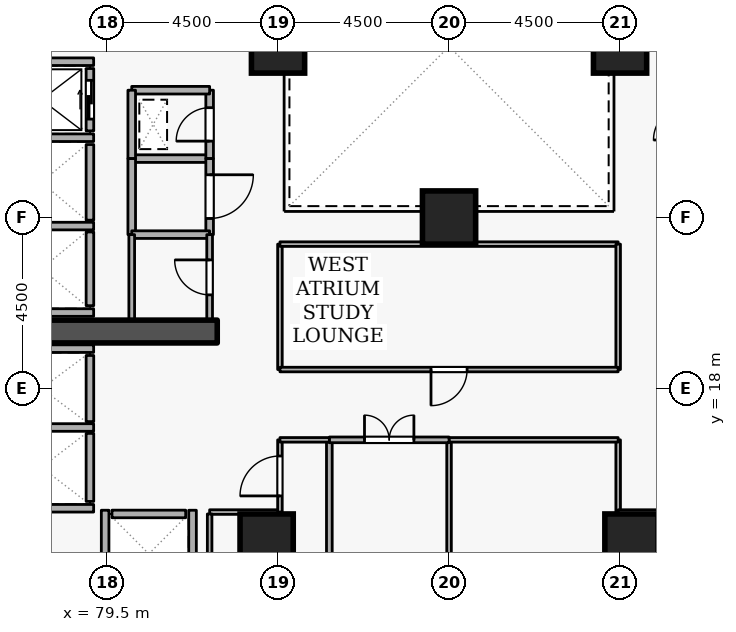
"""IFC4 building model, lengths in metres.
Left out: names, types, materials, properties, quantities, classifications, styles, units other than length and angle.
Written with IfcOpenShell. Run it as: python <this file> out.ifc"""

import sys

from ifc_helpers import new_model, si_unit, direction, frame, frame_2d, origin, origin_2d, place, context, subcontext, project, spatial, rectangle, extrude, element, fill, save


model = new_model("IFC4")
c1 = context("Model", 3, precision=1e-05, world=origin(), true_north=direction((0.0, 1.0)))
c2 = subcontext(c1, "Body", "Model", "MODEL_VIEW")
j1 = project(units=[si_unit("LENGTHUNIT", "METRE"), si_unit("PLANEANGLEUNIT", "RADIAN")], contexts=[c1])
p1 = place(None, origin())
s1 = spatial("IfcSite", under=j1, at=p1, CompositionType="ELEMENT")
p2 = place(p1, origin())
s2 = spatial("IfcBuilding", under=s1, at=p2, CompositionType="ELEMENT")
p3 = place(p2, frame((0.0, 0.0, 38.7)))
s3 = spatial("IfcBuildingStorey", under=s2, at=p3, CompositionType="ELEMENT", Elevation=38.7)
p4 = place(p3, frame((76.7, 19.5, 0.0), z_axis=(0.0, 0.0, 1.0), x_axis=(1.0, 0.0, 0.0)))
e1 = element("IfcWall", 1, at=p4, inside=s3, PredefinedType="SHEAR", context=c2, shape_type="SweptSolid", body=[
    extrude(rectangle(XDim=5.7, YDim=0.6, at=frame_2d((2.85, 0.0))), origin(), (0.0, 0.0, 1.0), 3.6),
])
for number, where, z_axis, x_axis in (
    (2, (93.3, 14.0, 0.0), (0.0, 0.0, 1.0), (1.0, 0.0, 0.0)),
    (3, (83.7, 14.0, 0.0), (0.0, 0.0, 1.0), (1.0, 0.0, 0.0)),
    (4, (93.0, 27.0, 0.0), (0.0, 0.0, 1.0), (1.0, 0.0, 0.0)),
    (5, (84.0, 27.0, 0.0), (0.0, 0.0, 1.0), (1.0, 0.0, 0.0)),
    (6, (88.5, 22.5, 0.0), (0.0, 0.0, 1.0), (1.0, 0.0, 0.0)),
):
    element("IfcColumn", number, at=place(p3, frame(where, z_axis=z_axis, x_axis=x_axis)), inside=s3, PredefinedType="COLUMN", context=c2, shape_type="SweptSolid", body=[
        extrude(rectangle(XDim=1.4, YDim=1.4, at=origin_2d()), origin(), (0.0, 0.0, 1.0), 3.6),
    ])
p5 = place(p3, frame((79.05, 24.78, 0.0), z_axis=(0.0, 0.0, 1.0), x_axis=(0.0, 1.0, 0.0)))
e7 = element("IfcWall", 7, at=p5, inside=s3, PredefinedType="STANDARD", context=c2, shape_type="SweptSolid", body=[
    extrude(rectangle(XDim=1.64, YDim=0.2, at=frame_2d((0.82, 0.0))), origin(), (0.0, 0.0, 1.0), 3.34),
])
p6 = place(p5, frame((0.31, 0.0, 0.0)))
e8 = element("IfcOpeningElement", 8, at=p6, cuts=e7, PredefinedType="OPENING", context=c2, shape_type="SweptSolid", body=[
    extrude(rectangle(XDim=1.02, YDim=2.06, at=frame_2d((0.51, 1.03))), frame((0.0, 0.11, 0.0), z_axis=(0.0, -1.0, 0.0), x_axis=(1.0, 0.0, 0.0)), (0.0, 0.0, 1.0), 0.22),
])
p7 = place(p3, frame((79.05, 22.43, 0.0), z_axis=(0.0, 0.0, 1.0), x_axis=(0.0, 1.0, 0.0)))
e9 = element("IfcWall", 9, at=p7, inside=s3, PredefinedType="STANDARD", context=c2, shape_type="SweptSolid", body=[
    extrude(rectangle(XDim=1.99, YDim=0.2, at=frame_2d((0.995, 0.0))), origin(), (0.0, 0.0, 1.0), 3.34),
])
p8 = place(p3, frame((79.05, 20.18, 0.0), z_axis=(0.0, 0.0, 1.0), x_axis=(0.0, 1.0, 0.0)))
e10 = element("IfcWall", 10, at=p8, inside=s3, PredefinedType="STANDARD", context=c2, shape_type="SweptSolid", body=[
    extrude(rectangle(XDim=1.94, YDim=0.2, at=frame_2d((0.97, 0.0))), origin(), (0.0, 0.0, 1.0), 3.34),
])
p9 = place(p3, frame((79.05, 17.13, 0.0), z_axis=(0.0, 0.0, 1.0), x_axis=(0.0, 1.0, 0.0)))
e11 = element("IfcWall", 11, at=p9, inside=s3, PredefinedType="STANDARD", context=c2, shape_type="SweptSolid", body=[
    extrude(rectangle(XDim=1.74, YDim=0.2, at=frame_2d((0.87, 0.0))), origin(), (0.0, 0.0, 1.0), 3.34),
])
p10 = place(p3, frame((79.05, 15.03, 0.0), z_axis=(0.0, 0.0, 1.0), x_axis=(0.0, 1.0, 0.0)))
e12 = element("IfcWall", 12, at=p10, inside=s3, PredefinedType="STANDARD", context=c2, shape_type="SweptSolid", body=[
    extrude(rectangle(XDim=1.79, YDim=0.2, at=frame_2d((0.895, 0.0))), origin(), (0.0, 0.0, 1.0), 3.34),
])
p11 = place(p3, frame((79.63, 14.7, 0.0), z_axis=(0.0, 0.0, 1.0), x_axis=(1.0, 0.0, 0.0)))
e13 = element("IfcWall", 13, at=p11, inside=s3, PredefinedType="STANDARD", context=c2, shape_type="SweptSolid", body=[
    extrude(rectangle(XDim=1.94, YDim=0.2, at=frame_2d((0.97, 0.0))), origin(), (0.0, 0.0, 1.0), 3.34),
])
for number, where, z_axis, x_axis in (
    (14, (76.712, 26.6, 0.0), (0.0, 0.0, 1.0), (1.0, 0.0, 0.0)),
    (15, (76.712, 24.6, 0.0), (0.0, 0.0, 1.0), (1.0, 0.0, 0.0)),
    (16, (76.712, 22.275, 0.0), (0.0, 0.0, 1.0), (1.0, 0.0, 0.0)),
    (17, (76.712, 20.0, 0.0), (0.0, 0.0, 1.0), (1.0, 0.0, 0.0)),
):
    element("IfcWall", number, at=place(p3, frame(where, z_axis=z_axis, x_axis=x_axis)), inside=s3, PredefinedType="STANDARD", context=c2, shape_type="SweptSolid", body=[
        extrude(rectangle(XDim=2.436, YDim=0.2, at=frame_2d((1.218, 0.0))), origin(), (0.0, 0.0, 1.0), 3.34),
    ])
p12 = place(p3, frame((76.402, 19.05, 0.0), z_axis=(0.0, 0.0, 1.0), x_axis=(1.0, 0.0, 0.0)))
e18 = element("IfcWall", 18, at=p12, inside=s3, PredefinedType="STANDARD", context=c2, shape_type="SweptSolid", body=[
    extrude(rectangle(XDim=2.746, YDim=0.2, at=frame_2d((1.373, 0.0))), origin(), (0.0, 0.0, 1.0), 2.545),
])
p13 = place(p3, frame((76.402, 16.975, 0.0), z_axis=(0.0, 0.0, 1.0), x_axis=(1.0, 0.0, 0.0)))
e19 = element("IfcWall", 19, at=p13, inside=s3, PredefinedType="STANDARD", context=c2, shape_type="SweptSolid", body=[
    extrude(rectangle(XDim=2.746, YDim=0.2, at=frame_2d((1.373, 0.0))), origin(), (0.0, 0.0, 1.0), 3.34),
])
p14 = place(p3, frame((76.512, 14.85, 0.0), z_axis=(0.0, 0.0, 1.0), x_axis=(1.0, 0.0, 0.0)))
e20 = element("IfcWall", 20, at=p14, inside=s3, PredefinedType="STANDARD", context=c2, shape_type="SweptSolid", body=[
    extrude(rectangle(XDim=2.636, YDim=0.2, at=frame_2d((1.318, 0.0))), origin(), (0.0, 0.0, 1.0), 3.34),
])
for number, where, z_axis, x_axis in (
    (21, (81.75, 12.612, 0.0), (0.0, 0.0, 1.0), (0.0, 1.0, 0.0)),
    (22, (79.45, 12.612, 0.0), (0.0, 0.0, 1.0), (0.0, 1.0, 0.0)),
):
    element("IfcWall", number, at=place(p3, frame(where, z_axis=z_axis, x_axis=x_axis)), inside=s3, PredefinedType="STANDARD", context=c2, shape_type="SweptSolid", body=[
        extrude(rectangle(XDim=2.186, YDim=0.2, at=frame_2d((1.093, 0.0))), origin(), (0.0, 0.0, 1.0), 3.34),
    ])
p15 = place(p3, frame((80.15, 24.05, 0.0), z_axis=(0.0, 0.0, 1.0), x_axis=(1.0, 0.0, 0.0)))
e23 = element("IfcWall", 23, at=p15, inside=s3, PredefinedType="STANDARD", context=c2, shape_type="SweptSolid", body=[
    extrude(rectangle(XDim=2.05, YDim=0.2, at=frame_2d((1.025, 0.0))), origin(), (0.0, 0.0, 1.0), 3.34),
])
p16 = place(p3, frame((82.2, 24.05, 0.0), z_axis=(0.0, 0.0, 1.0), x_axis=(0.0, 1.0, 0.0)))
e24 = element("IfcWall", 24, at=p16, inside=s3, PredefinedType="STANDARD", context=c2, shape_type="SweptSolid", body=[
    extrude(rectangle(XDim=1.8, YDim=0.2, at=frame_2d((0.9, 0.0))), origin(), (0.0, 0.0, 1.0), 3.34),
])
p17 = place(p16, frame((0.46, 0.0, 0.0)))
e25 = element("IfcOpeningElement", 25, at=p17, cuts=e24, PredefinedType="OPENING", context=c2, shape_type="SweptSolid", body=[
    extrude(rectangle(XDim=0.88, YDim=2.04, at=frame_2d((0.44, 1.02))), frame((0.0, 0.11, 0.0), z_axis=(0.0, -1.0, 0.0), x_axis=(1.0, 0.0, 0.0)), (0.0, 0.0, 1.0), 0.22),
])
p18 = place(p3, frame((82.2, 25.85, 0.0), z_axis=(0.0, 0.0, 1.0), x_axis=(-1.0, 0.0, 0.0)))
e26 = element("IfcWall", 26, at=p18, inside=s3, PredefinedType="STANDARD", context=c2, shape_type="SweptSolid", body=[
    extrude(rectangle(XDim=2.05, YDim=0.2, at=frame_2d((1.025, 0.0))), origin(), (0.0, 0.0, 1.0), 3.34),
])
p19 = place(p3, frame((80.15, 25.85, 0.0), z_axis=(0.0, 0.0, 1.0), x_axis=(0.0, -1.0, 0.0)))
e27 = element("IfcWall", 27, at=p19, inside=s3, PredefinedType="STANDARD", context=c2, shape_type="SweptSolid", body=[
    extrude(rectangle(XDim=1.8, YDim=0.2, at=frame_2d((0.9, 0.0))), origin(), (0.0, 0.0, 1.0), 3.34),
])
p20 = place(p3, frame((80.15, 22.05, 0.0), z_axis=(0.0, 0.0, 1.0), x_axis=(0.0, 1.0, 0.0)))
e28 = element("IfcWall", 28, at=p20, inside=s3, PredefinedType="STANDARD", context=c2, shape_type="SweptSolid", body=[
    extrude(rectangle(XDim=2.0, YDim=0.2, at=frame_2d((1.0, 0.0))), origin(), (0.0, 0.0, 1.0), 3.34),
])
p21 = place(p3, frame((82.2, 24.05, 0.0), z_axis=(0.0, 0.0, 1.0), x_axis=(0.0, -1.0, 0.0)))
e29 = element("IfcWall", 29, at=p21, inside=s3, PredefinedType="STANDARD", context=c2, shape_type="SweptSolid", body=[
    extrude(rectangle(XDim=2.0, YDim=0.2, at=frame_2d((1.0, 0.0))), origin(), (0.0, 0.0, 1.0), 3.34),
])
p22 = place(p21, frame((0.425, 0.0, 0.0)))
e30 = element("IfcOpeningElement", 30, at=p22, cuts=e29, PredefinedType="OPENING", context=c2, shape_type="SweptSolid", body=[
    extrude(rectangle(XDim=1.15, YDim=2.1, at=frame_2d((0.575, 1.05))), frame((0.0, 0.11, 0.0), z_axis=(0.0, -1.0, 0.0), x_axis=(1.0, 0.0, 0.0)), (0.0, 0.0, 1.0), 0.22),
])
p23 = place(p3, frame((82.2, 22.05, 0.0), z_axis=(0.0, 0.0, 1.0), x_axis=(-1.0, 0.0, 0.0)))
e31 = element("IfcWall", 31, at=p23, inside=s3, PredefinedType="STANDARD", context=c2, shape_type="SweptSolid", body=[
    extrude(rectangle(XDim=2.05, YDim=0.2, at=frame_2d((1.025, 0.0))), origin(), (0.0, 0.0, 1.0), 3.34),
])
p24 = place(p3, frame((82.2, 19.8, 0.0), z_axis=(0.0, 0.0, 1.0), x_axis=(0.0, 1.0, 0.0)))
e32 = element("IfcWall", 32, at=p24, inside=s3, PredefinedType="PARTITIONING", context=c2, shape_type="SweptSolid", body=[
    extrude(rectangle(XDim=2.25, YDim=0.15, at=frame_2d((1.125, 0.0))), origin(), (0.0, 0.0, 1.0), 3.34),
])
p25 = place(p24, frame((0.665, 0.0, 0.0)))
e33 = element("IfcOpeningElement", 33, at=p25, cuts=e32, PredefinedType="OPENING", context=c2, shape_type="SweptSolid", body=[
    extrude(rectangle(XDim=0.92, YDim=2.08, at=frame_2d((0.46, 1.04))), frame((0.0, 0.085, 0.0), z_axis=(0.0, -1.0, 0.0), x_axis=(1.0, 0.0, 0.0)), (0.0, 0.0, 1.0), 0.17),
])
p26 = place(p3, frame((80.15, 22.05, 0.0), z_axis=(0.0, 0.0, 1.0), x_axis=(0.0, -1.0, 0.0)))
e34 = element("IfcWall", 34, at=p26, inside=s3, PredefinedType="PARTITIONING", context=c2, shape_type="SweptSolid", body=[
    extrude(rectangle(XDim=2.25, YDim=0.15, at=frame_2d((1.125, 0.0))), origin(), (0.0, 0.0, 1.0), 3.34),
])
p27 = place(p3, frame((92.95, 16.65, 0.0), z_axis=(0.0, 0.0, 1.0), x_axis=(0.0, -1.0, 0.0)))
e35 = element("IfcWall", 35, at=p27, inside=s3, PredefinedType="PARTITIONING", context=c2, shape_type="SweptSolid", body=[
    extrude(rectangle(XDim=1.9, YDim=0.12, at=frame_2d((0.95, 0.0))), origin(), (0.0, 0.0, 1.0), 3.34),
])
p28 = place(p3, frame((92.95, 14.75, 0.0), z_axis=(0.0, 0.0, 1.0), x_axis=(1.0, 0.0, 0.0)))
e36 = element("IfcWall", 36, at=p28, inside=s3, PredefinedType="PARTITIONING", context=c2, shape_type="SweptSolid", body=[
    extrude(rectangle(XDim=1.85, YDim=0.12, at=frame_2d((0.925, 0.0))), origin(), (0.0, 0.0, 1.0), 3.34),
])
p29 = place(p3, frame((88.5, 2.78, 0.0), z_axis=(0.0, 0.0, 1.0), x_axis=(0.0, 1.0, 0.0)))
e37 = element("IfcWall", 37, at=p29, inside=s3, PredefinedType="PARTITIONING", context=c2, shape_type="SweptSolid", body=[
    extrude(rectangle(XDim=13.87, YDim=0.12, at=frame_2d((6.935, 0.0))), origin(), (0.0, 0.0, 1.0), 2.882),
])
p30 = place(p3, frame((88.5, 16.65, 0.0), z_axis=(0.0, 0.0, 1.0), x_axis=(1.0, 0.0, 0.0)))
e38 = element("IfcWall", 38, at=p30, inside=s3, PredefinedType="PARTITIONING", context=c2, shape_type="SweptSolid", body=[
    extrude(rectangle(XDim=4.45, YDim=0.12, at=frame_2d((2.225, 0.0))), origin(), (0.0, 0.0, 1.0), 3.34),
])
p31 = place(p3, frame((85.35, 2.78, 0.0), z_axis=(0.0, 0.0, 1.0), x_axis=(0.0, 1.0, 0.0)))
e39 = element("IfcWall", 39, at=p31, inside=s3, PredefinedType="PARTITIONING", context=c2, shape_type="SweptSolid", body=[
    extrude(rectangle(XDim=13.87, YDim=0.15, at=frame_2d((6.935, 0.0))), origin(), (0.0, 0.0, 1.0), 3.34),
])
p32 = place(p3, frame((85.35, 16.65, 0.0), z_axis=(0.0, 0.0, 1.0), x_axis=(1.0, 0.0, 0.0)))
e40 = element("IfcWall", 40, at=p32, inside=s3, PredefinedType="PARTITIONING", context=c2, shape_type="SweptSolid", body=[
    extrude(rectangle(XDim=3.15, YDim=0.15, at=frame_2d((1.575, 0.0))), origin(), (0.0, 0.0, 1.0), 3.34),
])
p33 = place(p32, frame((0.925, 0.0, 0.0)))
e41 = element("IfcOpeningElement", 41, at=p33, cuts=e40, PredefinedType="OPENING", context=c2, shape_type="SweptSolid", body=[
    extrude(rectangle(XDim=1.3, YDim=2.12, at=frame_2d((0.65, 1.06))), frame((0.0, 0.085, 0.0), z_axis=(0.0, -1.0, 0.0), x_axis=(1.0, 0.0, 0.0)), (0.0, 0.0, 1.0), 0.17),
])
p34 = place(p3, frame((82.2, 14.75, 0.0), z_axis=(0.0, 0.0, 1.0), x_axis=(1.0, 0.0, 0.0)))
e42 = element("IfcWall", 42, at=p34, inside=s3, PredefinedType="PARTITIONING", context=c2, shape_type="SweptSolid", body=[
    extrude(rectangle(XDim=1.85, YDim=0.12, at=frame_2d((0.925, 0.0))), origin(), (0.0, 0.0, 1.0), 3.34),
])
p35 = place(p3, frame((84.05, 14.75, 0.0), z_axis=(0.0, 0.0, 1.0), x_axis=(0.0, 1.0, 0.0)))
e43 = element("IfcWall", 43, at=p35, inside=s3, PredefinedType="PARTITIONING", context=c2, shape_type="SweptSolid", body=[
    extrude(rectangle(XDim=1.9, YDim=0.12, at=frame_2d((0.95, 0.0))), origin(), (0.0, 0.0, 1.0), 3.34),
])
p36 = place(p35, frame((0.425, 0.0, 0.0)))
e44 = element("IfcOpeningElement", 44, at=p36, cuts=e43, PredefinedType="OPENING", context=c2, shape_type="SweptSolid", body=[
    extrude(rectangle(XDim=1.05, YDim=2.1, at=frame_2d((0.525, 1.05))), frame((0.0, 0.07, 0.0), z_axis=(0.0, -1.0, 0.0), x_axis=(1.0, 0.0, 0.0)), (0.0, 0.0, 1.0), 0.14),
])
p37 = place(p3, frame((84.05, 16.65, 0.0), z_axis=(0.0, 0.0, 1.0), x_axis=(1.0, 0.0, 0.0)))
e45 = element("IfcWall", 45, at=p37, inside=s3, PredefinedType="PARTITIONING", context=c2, shape_type="SweptSolid", body=[
    extrude(rectangle(XDim=1.3, YDim=0.12, at=frame_2d((0.65, 0.0))), origin(), (0.0, 0.0, 1.0), 3.34),
])
p38 = place(p3, frame((82.2, 12.4, 0.0), z_axis=(0.0, 0.0, 1.0), x_axis=(0.0, 1.0, 0.0)))
e46 = element("IfcWall", 46, at=p38, inside=s3, PredefinedType="PARTITIONING", context=c2, shape_type="SweptSolid", body=[
    extrude(rectangle(XDim=2.3, YDim=0.12, at=frame_2d((1.15, 0.0))), origin(), (0.0, 0.0, 1.0), 3.34),
])
p39 = place(p3, frame((84.05, 18.5, 0.0), z_axis=(0.0, 0.0, 1.0), x_axis=(0.0, 1.0, 0.0)))
e47 = element("IfcWall", 47, at=p39, inside=s3, PredefinedType="PARTITIONING", context=c2, shape_type="SweptSolid", body=[
    extrude(rectangle(XDim=3.3, YDim=0.12, at=frame_2d((1.65, 0.0))), origin(), (0.0, 0.0, 1.0), 3.34),
])
p40 = place(p3, frame((84.05, 21.8, 0.0), z_axis=(0.0, 0.0, 1.0), x_axis=(1.0, 0.0, 0.0)))
e48 = element("IfcWall", 48, at=p40, inside=s3, PredefinedType="PARTITIONING", context=c2, shape_type="SweptSolid", body=[
    extrude(rectangle(XDim=8.9, YDim=0.12, at=frame_2d((4.45, 0.0))), origin(), (0.0, 0.0, 1.0), 3.34),
])
p41 = place(p3, frame((92.95, 21.8, 0.0), z_axis=(0.0, 0.0, 1.0), x_axis=(0.0, -1.0, 0.0)))
e49 = element("IfcWall", 49, at=p41, inside=s3, PredefinedType="PARTITIONING", context=c2, shape_type="SweptSolid", body=[
    extrude(rectangle(XDim=3.3, YDim=0.12, at=frame_2d((1.65, 0.0))), origin(), (0.0, 0.0, 1.0), 3.34),
])
p42 = place(p3, frame((92.95, 18.5, 0.0), z_axis=(0.0, 0.0, 1.0), x_axis=(-1.0, 0.0, 0.0)))
e50 = element("IfcWall", 50, at=p42, inside=s3, PredefinedType="PARTITIONING", context=c2, shape_type="SweptSolid", body=[
    extrude(rectangle(XDim=8.9, YDim=0.12, at=frame_2d((4.45, 0.0))), origin(), (0.0, 0.0, 1.0), 3.34),
])
p43 = place(p42, frame((3.975, 0.0, 0.0)))
e51 = element("IfcOpeningElement", 51, at=p43, cuts=e50, PredefinedType="OPENING", context=c2, shape_type="SweptSolid", body=[
    extrude(rectangle(XDim=0.95, YDim=2.1, at=frame_2d((0.475, 1.05))), frame((0.0, 0.07, 0.0), z_axis=(0.0, -1.0, 0.0), x_axis=(1.0, 0.0, 0.0)), (0.0, 0.0, 1.0), 0.14),
])
p44 = place(p6, origin())
e52 = element("IfcDoor", 52, at=p44, inside=s3, OperationType="SLIDING_TO_LEFT", PredefinedType="DOOR", context=c2, shape_type="SweptSolid", body=[
    extrude(rectangle(XDim=1.02, YDim=2.06, at=frame_2d((0.51, 1.03))), frame((0.0, 0.025, 0.0), z_axis=(0.0, -1.0, 0.0), x_axis=(1.0, 0.0, 0.0)), (0.0, 0.0, 1.0), 0.05),
])
fill(e8, e52)
p45 = place(p17, origin())
e53 = element("IfcDoor", 53, at=p45, inside=s3, OperationType="SINGLE_SWING_LEFT", PredefinedType="DOOR", context=c2, shape_type="SweptSolid", body=[
    extrude(rectangle(XDim=0.88, YDim=2.04, at=frame_2d((0.44, 1.02))), frame((0.0, 0.025, 0.0), z_axis=(0.0, -1.0, 0.0), x_axis=(1.0, 0.0, 0.0)), (0.0, 0.0, 1.0), 0.05),
])
fill(e25, e53)
p46 = place(p25, origin())
e54 = element("IfcDoor", 54, at=p46, inside=s3, OperationType="SINGLE_SWING_RIGHT", PredefinedType="DOOR", context=c2, shape_type="SweptSolid", body=[
    extrude(rectangle(XDim=0.92, YDim=2.08, at=frame_2d((0.46, 1.04))), frame((0.0, 0.025, 0.0), z_axis=(0.0, -1.0, 0.0), x_axis=(1.0, 0.0, 0.0)), (0.0, 0.0, 1.0), 0.05),
])
fill(e33, e54)
p47 = place(p22, origin())
e55 = element("IfcDoor", 55, at=p47, inside=s3, OperationType="SINGLE_SWING_LEFT", PredefinedType="DOOR", context=c2, shape_type="SweptSolid", body=[
    extrude(rectangle(XDim=1.15, YDim=2.1, at=frame_2d((0.575, 1.05))), frame((0.0, 0.025, 0.0), z_axis=(0.0, -1.0, 0.0), x_axis=(1.0, 0.0, 0.0)), (0.0, 0.0, 1.0), 0.05),
])
fill(e30, e55)
p48 = place(p33, origin())
e56 = element("IfcDoor", 56, at=p48, inside=s3, OperationType="DOUBLE_DOOR_SINGLE_SWING", PredefinedType="DOOR", context=c2, shape_type="SweptSolid", body=[
    extrude(rectangle(XDim=1.3, YDim=2.12, at=frame_2d((0.65, 1.06))), frame((0.0, 0.025, 0.0), z_axis=(0.0, -1.0, 0.0), x_axis=(1.0, 0.0, 0.0)), (0.0, 0.0, 1.0), 0.05),
])
fill(e41, e56)
p49 = place(p36, origin())
e57 = element("IfcDoor", 57, at=p49, inside=s3, OperationType="SINGLE_SWING_LEFT", PredefinedType="DOOR", context=c2, shape_type="SweptSolid", body=[
    extrude(rectangle(XDim=1.05, YDim=2.1, at=frame_2d((0.525, 1.05))), frame((0.0, 0.025, 0.0), z_axis=(0.0, -1.0, 0.0), x_axis=(1.0, 0.0, 0.0)), (0.0, 0.0, 1.0), 0.05),
])
fill(e44, e57)
p50 = place(p43, origin())
e58 = element("IfcDoor", 58, at=p50, inside=s3, OperationType="SINGLE_SWING_RIGHT", PredefinedType="DOOR", context=c2, shape_type="SweptSolid", body=[
    extrude(rectangle(XDim=0.95, YDim=2.1, at=frame_2d((0.475, 1.05))), frame((0.0, 0.025, 0.0), z_axis=(0.0, -1.0, 0.0), x_axis=(1.0, 0.0, 0.0)), (0.0, 0.0, 1.0), 0.05),
])
fill(e51, e58)
save(model, sys.argv[1])
